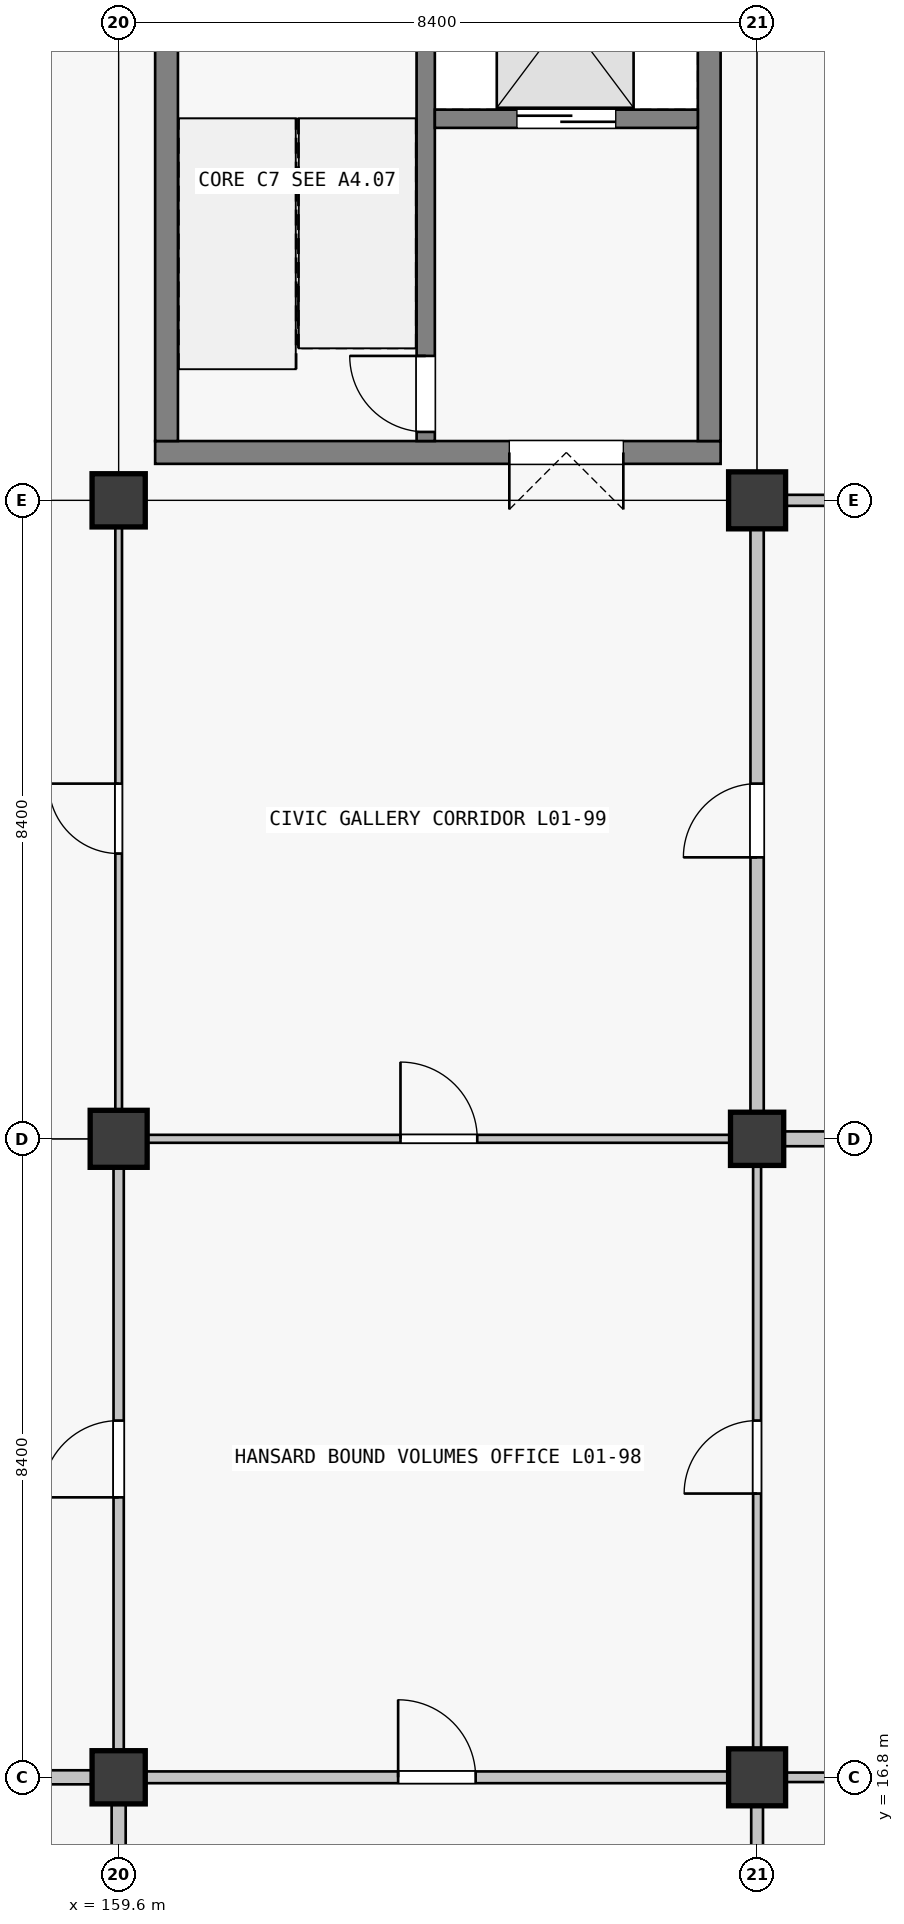
"""IFC4 building model, lengths in metres.
Left out: names, types, materials, properties, quantities, classifications, styles, units other than length and angle.
Written with IfcOpenShell. Run it as: python <this file> out.ifc"""

import sys

from ifc_helpers import new_model, si_unit, direction, frame, frame_2d, origin, origin_2d, place, context, subcontext, project, spatial, rectangle, extrude, element, fill, save


model = new_model("IFC4")
c1 = context("Model", 3, precision=1e-05, world=origin(), true_north=direction((0.0, 1.0)))
c2 = subcontext(c1, "Body", "Model", "MODEL_VIEW")
j1 = project(units=[si_unit("LENGTHUNIT", "METRE"), si_unit("PLANEANGLEUNIT", "RADIAN")], contexts=[c1])
p1 = place(None, origin())
s1 = spatial("IfcSite", under=j1, at=p1, CompositionType="ELEMENT")
p2 = place(p1, origin())
s2 = spatial("IfcBuilding", under=s1, at=p2, CompositionType="ELEMENT")
p3 = place(p2, frame((0.0, 0.0, 5.76)))
s3 = spatial("IfcBuildingStorey", under=s2, at=p3, CompositionType="ELEMENT", Elevation=5.76)
p4 = place(p3, frame((159.6, 16.8, 0.0), z_axis=(0.0, 0.0, 1.0), x_axis=(1.0, 0.0, 0.0)))
e1 = element("IfcColumn", 1, at=p4, inside=s3, PredefinedType="COLUMN", context=c2, shape_type="SweptSolid", body=[
    extrude(rectangle(XDim=0.7, YDim=0.7, at=origin_2d()), origin(), (0.0, 0.0, 1.0), 4.5),
])
p5 = place(p3, frame((159.6, 25.2, 0.0), z_axis=(0.0, 0.0, 1.0), x_axis=(1.0, 0.0, 0.0)))
e2 = element("IfcColumn", 2, at=p5, inside=s3, PredefinedType="COLUMN", context=c2, shape_type="SweptSolid", body=[
    extrude(rectangle(XDim=0.75, YDim=0.75, at=origin_2d()), origin(), (0.0, 0.0, 1.0), 4.5),
])
p6 = place(p3, frame((159.6, 33.6, 0.0), z_axis=(0.0, 0.0, 1.0), x_axis=(1.0, 0.0, 0.0)))
e3 = element("IfcColumn", 3, at=p6, inside=s3, PredefinedType="COLUMN", context=c2, shape_type="SweptSolid", body=[
    extrude(rectangle(XDim=0.7, YDim=0.7, at=origin_2d()), origin(), (0.0, 0.0, 1.0), 4.5),
])
p7 = place(p3, frame((168.0, 16.8, 0.0), z_axis=(0.0, 0.0, 1.0), x_axis=(1.0, 0.0, 0.0)))
e4 = element("IfcColumn", 4, at=p7, inside=s3, PredefinedType="COLUMN", context=c2, shape_type="SweptSolid", body=[
    extrude(rectangle(XDim=0.75, YDim=0.75, at=origin_2d()), origin(), (0.0, 0.0, 1.0), 4.5),
])
p8 = place(p3, frame((168.0, 25.2, 0.0), z_axis=(0.0, 0.0, 1.0), x_axis=(1.0, 0.0, 0.0)))
e5 = element("IfcColumn", 5, at=p8, inside=s3, PredefinedType="COLUMN", context=c2, shape_type="SweptSolid", body=[
    extrude(rectangle(XDim=0.7, YDim=0.7, at=origin_2d()), origin(), (0.0, 0.0, 1.0), 4.5),
])
p9 = place(p3, frame((168.0, 33.6, 0.0), z_axis=(0.0, 0.0, 1.0), x_axis=(1.0, 0.0, 0.0)))
e6 = element("IfcColumn", 6, at=p9, inside=s3, PredefinedType="COLUMN", context=c2, shape_type="SweptSolid", body=[
    extrude(rectangle(XDim=0.75, YDim=0.75, at=origin_2d()), origin(), (0.0, 0.0, 1.0), 4.5),
])
p10 = place(p3, frame((167.52, 34.23, 0.0), z_axis=(0.0, 0.0, 1.0), x_axis=(-1.0, 0.0, 0.0)))
e7 = element("IfcWall", 7, at=p10, inside=s3, PredefinedType="SHEAR", context=c2, shape_type="SweptSolid", body=[
    extrude(rectangle(XDim=7.44, YDim=0.3, at=frame_2d((3.72, 0.0))), origin(), (0.0, 0.0, 1.0), 4.5),
])
p11 = place(p10, frame((1.28, 0.0, 0.0)))
e8 = element("IfcOpeningElement", 8, at=p11, cuts=e7, PredefinedType="OPENING", context=c2, shape_type="SweptSolid", body=[
    extrude(rectangle(XDim=1.5, YDim=2.15, at=frame_2d((0.75, 1.075))), frame((0.0, 0.15, 0.0), z_axis=(0.0, -1.0, 0.0), x_axis=(1.0, 0.0, 0.0)), (0.0, 0.0, 1.0), 0.3),
])
for number, where, z_axis, x_axis in (
    (9, (160.23, 34.38, 0.0), (0.0, 0.0, 1.0), (0.0, 1.0, 0.0)),
    (10, (167.37, 41.22, 0.0), (0.0, 0.0, 1.0), (0.0, -1.0, 0.0)),
):
    element("IfcWall", number, at=place(p3, frame(where, z_axis=z_axis, x_axis=x_axis)), inside=s3, PredefinedType="SHEAR", context=c2, shape_type="SweptSolid", body=[
        extrude(rectangle(XDim=6.84, YDim=0.3, at=frame_2d((3.42, 0.0))), origin(), (0.0, 0.0, 1.0), 4.5),
    ])
p12 = place(p3, frame((163.64, 34.38, 0.0), z_axis=(0.0, 0.0, 1.0), x_axis=(0.0, 1.0, 0.0)))
e11 = element("IfcWall", 11, at=p12, inside=s3, PredefinedType="SHEAR", context=c2, shape_type="SweptSolid", body=[
    extrude(rectangle(XDim=6.84, YDim=0.24, at=frame_2d((3.42, 0.0))), origin(), (0.0, 0.0, 1.0), 4.5),
])
p13 = place(p12, frame((0.12, 0.0, 0.0)))
e12 = element("IfcOpeningElement", 12, at=p13, cuts=e11, PredefinedType="OPENING", context=c2, shape_type="SweptSolid", body=[
    extrude(rectangle(XDim=1.0, YDim=2.15, at=frame_2d((0.5, 1.075))), frame((0.0, 0.12, 0.0), z_axis=(0.0, -1.0, 0.0), x_axis=(1.0, 0.0, 0.0)), (0.0, 0.0, 1.0), 0.24),
])
p14 = place(p3, frame((163.76, 38.62, 0.0), z_axis=(0.0, 0.0, 1.0), x_axis=(1.0, 0.0, 0.0)))
e13 = element("IfcWall", 13, at=p14, inside=s3, PredefinedType="SHEAR", context=c2, shape_type="SweptSolid", body=[
    extrude(rectangle(XDim=3.46, YDim=0.24, at=frame_2d((1.73, 0.0))), origin(), (0.0, 0.0, 1.0), 4.5),
])
p15 = place(p14, frame((1.08, 0.0, 0.0)))
e14 = element("IfcOpeningElement", 14, at=p15, cuts=e13, PredefinedType="OPENING", context=c2, shape_type="SweptSolid", body=[
    extrude(rectangle(XDim=1.3, YDim=2.25, at=frame_2d((0.65, 1.125))), frame((0.0, 0.12, 0.0), z_axis=(0.0, -1.0, 0.0), x_axis=(1.0, 0.0, 0.0)), (0.0, 0.0, 1.0), 0.24),
])
p16 = place(p3, frame((151.577, 16.8, 0.0), z_axis=(0.0, 0.0, 1.0), x_axis=(1.0, 0.0, 0.0)))
e15 = element("IfcWall", 15, at=p16, inside=s3, PredefinedType="PARTITIONING", context=c2, shape_type="SweptSolid", body=[
    extrude(rectangle(XDim=7.671, YDim=0.185, at=frame_2d((3.835, 0.0))), origin(), (0.0, 0.0, 1.0), 2.4),
])
p17 = place(p16, frame((3.356, 0.0, 0.0)))
e16 = element("IfcOpeningElement", 16, at=p17, cuts=e15, PredefinedType="OPENING", context=c2, shape_type="SweptSolid", body=[
    extrude(rectangle(XDim=0.96, YDim=2.18, at=frame_2d((0.48, 1.09))), frame((0.0, 0.093, 0.0), z_axis=(0.0, -1.0, 0.0), x_axis=(1.0, 0.0, 0.0)), (0.0, 0.0, 1.0), 0.185),
])
p18 = place(p3, frame((159.952, 16.8, 0.0), z_axis=(0.0, 0.0, 1.0), x_axis=(1.0, 0.0, 0.0)))
e17 = element("IfcWall", 17, at=p18, inside=s3, PredefinedType="PARTITIONING", context=c2, shape_type="SweptSolid", body=[
    extrude(rectangle(XDim=7.671, YDim=0.155, at=frame_2d((3.835, 0.0))), origin(), (0.0, 0.0, 1.0), 2.4),
])
p19 = place(p18, frame((3.325, 0.0, 0.0)))
e18 = element("IfcOpeningElement", 18, at=p19, cuts=e17, PredefinedType="OPENING", context=c2, shape_type="SweptSolid", body=[
    extrude(rectangle(XDim=1.02, YDim=2.2, at=frame_2d((0.51, 1.1))), frame((0.0, 0.078, 0.0), z_axis=(0.0, -1.0, 0.0), x_axis=(1.0, 0.0, 0.0)), (0.0, 0.0, 1.0), 0.155),
])
p20 = place(p3, frame((159.977, 25.2, 0.0), z_axis=(0.0, 0.0, 1.0), x_axis=(1.0, 0.0, 0.0)))
e19 = element("IfcWall", 19, at=p20, inside=s3, PredefinedType="PARTITIONING", context=c2, shape_type="SweptSolid", body=[
    extrude(rectangle(XDim=7.671, YDim=0.105, at=frame_2d((3.835, 0.0))), origin(), (0.0, 0.0, 1.0), 2.4),
])
p21 = place(p20, frame((3.331, 0.0, 0.0)))
e20 = element("IfcOpeningElement", 20, at=p21, cuts=e19, PredefinedType="OPENING", context=c2, shape_type="SweptSolid", body=[
    extrude(rectangle(XDim=1.01, YDim=2.12, at=frame_2d((0.505, 1.06))), frame((0.0, 0.052, 0.0), z_axis=(0.0, -1.0, 0.0), x_axis=(1.0, 0.0, 0.0)), (0.0, 0.0, 1.0), 0.105),
])
p22 = place(p3, frame((168.377, 16.8, 0.0), z_axis=(0.0, 0.0, 1.0), x_axis=(1.0, 0.0, 0.0)))
e21 = element("IfcWall", 21, at=p22, inside=s3, PredefinedType="PARTITIONING", context=c2, shape_type="SweptSolid", body=[
    extrude(rectangle(XDim=7.746, YDim=0.125, at=frame_2d((3.873, 0.0))), origin(), (0.0, 0.0, 1.0), 2.4),
])
p23 = place(p22, frame((3.343, 0.0, 0.0)))
e22 = element("IfcOpeningElement", 22, at=p23, cuts=e21, PredefinedType="OPENING", context=c2, shape_type="SweptSolid", body=[
    extrude(rectangle(XDim=1.06, YDim=2.22, at=frame_2d((0.53, 1.11))), frame((0.0, 0.062, 0.0), z_axis=(0.0, -1.0, 0.0), x_axis=(1.0, 0.0, 0.0)), (0.0, 0.0, 1.0), 0.125),
])
p24 = place(p3, frame((168.352, 25.2, 0.0), z_axis=(0.0, 0.0, 1.0), x_axis=(1.0, 0.0, 0.0)))
e23 = element("IfcWall", 23, at=p24, inside=s3, PredefinedType="PARTITIONING", context=c2, shape_type="SweptSolid", body=[
    extrude(rectangle(XDim=7.771, YDim=0.195, at=frame_2d((3.885, 0.0))), origin(), (0.0, 0.0, 1.0), 2.4),
])
p25 = place(p24, frame((3.385, 0.0, 0.0)))
e24 = element("IfcOpeningElement", 24, at=p25, cuts=e23, PredefinedType="OPENING", context=c2, shape_type="SweptSolid", body=[
    extrude(rectangle(XDim=1.0, YDim=2.2, at=frame_2d((0.5, 1.1))), frame((0.0, 0.098, 0.0), z_axis=(0.0, -1.0, 0.0), x_axis=(1.0, 0.0, 0.0)), (0.0, 0.0, 1.0), 0.195),
])
p26 = place(p3, frame((168.377, 33.6, 0.0), z_axis=(0.0, 0.0, 1.0), x_axis=(1.0, 0.0, 0.0)))
e25 = element("IfcWall", 25, at=p26, inside=s3, PredefinedType="PARTITIONING", context=c2, shape_type="SweptSolid", body=[
    extrude(rectangle(XDim=7.746, YDim=0.145, at=frame_2d((3.873, 0.0))), origin(), (0.0, 0.0, 1.0), 2.4),
])
p27 = place(p26, frame((3.353, 0.0, 0.0)))
e26 = element("IfcOpeningElement", 26, at=p27, cuts=e25, PredefinedType="OPENING", context=c2, shape_type="SweptSolid", body=[
    extrude(rectangle(XDim=1.04, YDim=2.2, at=frame_2d((0.52, 1.1))), frame((0.0, 0.073, 0.0), z_axis=(0.0, -1.0, 0.0), x_axis=(1.0, 0.0, 0.0)), (0.0, 0.0, 1.0), 0.145),
])
p28 = place(p3, frame((159.6, 8.727, 0.0), z_axis=(0.0, 0.0, 1.0), x_axis=(0.0, 1.0, 0.0)))
e27 = element("IfcWall", 27, at=p28, inside=s3, PredefinedType="PARTITIONING", context=c2, shape_type="SweptSolid", body=[
    extrude(rectangle(XDim=7.721, YDim=0.185, at=frame_2d((3.86, 0.0))), origin(), (0.0, 0.0, 1.0), 2.4),
])
p29 = place(p28, frame((3.33, 0.0, 0.0)))
e28 = element("IfcOpeningElement", 28, at=p29, cuts=e27, PredefinedType="OPENING", context=c2, shape_type="SweptSolid", body=[
    extrude(rectangle(XDim=1.06, YDim=2.22, at=frame_2d((0.53, 1.11))), frame((0.0, 0.093, 0.0), z_axis=(0.0, -1.0, 0.0), x_axis=(1.0, 0.0, 0.0)), (0.0, 0.0, 1.0), 0.185),
])
p30 = place(p3, frame((159.6, 17.152, 0.0), z_axis=(0.0, 0.0, 1.0), x_axis=(0.0, 1.0, 0.0)))
e29 = element("IfcWall", 29, at=p30, inside=s3, PredefinedType="PARTITIONING", context=c2, shape_type="SweptSolid", body=[
    extrude(rectangle(XDim=7.671, YDim=0.135, at=frame_2d((3.835, 0.0))), origin(), (0.0, 0.0, 1.0), 2.4),
])
p31 = place(p30, frame((3.331, 0.0, 0.0)))
e30 = element("IfcOpeningElement", 30, at=p31, cuts=e29, PredefinedType="OPENING", context=c2, shape_type="SweptSolid", body=[
    extrude(rectangle(XDim=1.01, YDim=2.12, at=frame_2d((0.505, 1.06))), frame((0.0, 0.067, 0.0), z_axis=(0.0, -1.0, 0.0), x_axis=(1.0, 0.0, 0.0)), (0.0, 0.0, 1.0), 0.135),
])
p32 = place(p3, frame((159.6, 25.577, 0.0), z_axis=(0.0, 0.0, 1.0), x_axis=(0.0, 1.0, 0.0)))
e31 = element("IfcWall", 31, at=p32, inside=s3, PredefinedType="PARTITIONING", context=c2, shape_type="SweptSolid", body=[
    extrude(rectangle(XDim=7.671, YDim=0.088, at=frame_2d((3.835, 0.0))), origin(), (0.0, 0.0, 1.0), 2.4),
])
p33 = place(p32, frame((3.376, 0.0, 0.0)))
e32 = element("IfcOpeningElement", 32, at=p33, cuts=e31, PredefinedType="OPENING", context=c2, shape_type="SweptSolid", body=[
    extrude(rectangle(XDim=0.92, YDim=2.15, at=frame_2d((0.46, 1.075))), frame((0.0, 0.044, 0.0), z_axis=(0.0, -1.0, 0.0), x_axis=(1.0, 0.0, 0.0)), (0.0, 0.0, 1.0), 0.088),
])
p34 = place(p3, frame((168.0, 8.702, 0.0), z_axis=(0.0, 0.0, 1.0), x_axis=(0.0, 1.0, 0.0)))
e33 = element("IfcWall", 33, at=p34, inside=s3, PredefinedType="PARTITIONING", context=c2, shape_type="SweptSolid", body=[
    extrude(rectangle(XDim=7.721, YDim=0.155, at=frame_2d((3.861, 0.0))), origin(), (0.0, 0.0, 1.0), 2.4),
])
p35 = place(p34, frame((3.37, 0.0, 0.0)))
e34 = element("IfcOpeningElement", 34, at=p35, cuts=e33, PredefinedType="OPENING", context=c2, shape_type="SweptSolid", body=[
    extrude(rectangle(XDim=0.98, YDim=2.18, at=frame_2d((0.49, 1.09))), frame((0.0, 0.078, 0.0), z_axis=(0.0, -1.0, 0.0), x_axis=(1.0, 0.0, 0.0)), (0.0, 0.0, 1.0), 0.155),
])
p36 = place(p3, frame((168.0, 17.177, 0.0), z_axis=(0.0, 0.0, 1.0), x_axis=(0.0, 1.0, 0.0)))
e35 = element("IfcWall", 35, at=p36, inside=s3, PredefinedType="PARTITIONING", context=c2, shape_type="SweptSolid", body=[
    extrude(rectangle(XDim=7.671, YDim=0.105, at=frame_2d((3.835, 0.0))), origin(), (0.0, 0.0, 1.0), 2.4),
])
p37 = place(p36, frame((3.356, 0.0, 0.0)))
e36 = element("IfcOpeningElement", 36, at=p37, cuts=e35, PredefinedType="OPENING", context=c2, shape_type="SweptSolid", body=[
    extrude(rectangle(XDim=0.96, YDim=2.18, at=frame_2d((0.48, 1.09))), frame((0.0, 0.052, 0.0), z_axis=(0.0, -1.0, 0.0), x_axis=(1.0, 0.0, 0.0)), (0.0, 0.0, 1.0), 0.105),
])
p38 = place(p3, frame((168.0, 25.552, 0.0), z_axis=(0.0, 0.0, 1.0), x_axis=(0.0, 1.0, 0.0)))
e37 = element("IfcWall", 37, at=p38, inside=s3, PredefinedType="PARTITIONING", context=c2, shape_type="SweptSolid", body=[
    extrude(rectangle(XDim=7.671, YDim=0.175, at=frame_2d((3.835, 0.0))), origin(), (0.0, 0.0, 1.0), 2.4),
])
p39 = place(p38, frame((3.351, 0.0, 0.0)))
e38 = element("IfcOpeningElement", 38, at=p39, cuts=e37, PredefinedType="OPENING", context=c2, shape_type="SweptSolid", body=[
    extrude(rectangle(XDim=0.97, YDim=2.12, at=frame_2d((0.485, 1.06))), frame((0.0, 0.087, 0.0), z_axis=(0.0, -1.0, 0.0), x_axis=(1.0, 0.0, 0.0)), (0.0, 0.0, 1.0), 0.175),
])
p40 = place(p13, origin())
e39 = element("IfcDoor", 39, at=p40, inside=s3, OperationType="SINGLE_SWING_RIGHT", PredefinedType="DOOR", context=c2, shape_type="SweptSolid", body=[
    extrude(rectangle(XDim=1.0, YDim=2.15, at=frame_2d((0.5, 1.075))), frame((0.0, 0.025, 0.0), z_axis=(0.0, -1.0, 0.0), x_axis=(1.0, 0.0, 0.0)), (0.0, 0.0, 1.0), 0.05),
])
fill(e12, e39)
p41 = place(p11, origin())
e40 = element("IfcDoor", 40, at=p41, inside=s3, OperationType="DOUBLE_DOOR_SINGLE_SWING", PredefinedType="DOOR", context=c2, shape_type="SweptSolid", body=[
    extrude(rectangle(XDim=1.5, YDim=2.15, at=frame_2d((0.75, 1.075))), frame((0.0, 0.025, 0.0), z_axis=(0.0, -1.0, 0.0), x_axis=(1.0, 0.0, 0.0)), (0.0, 0.0, 1.0), 0.05),
])
fill(e8, e40)
p42 = place(p15, origin())
e41 = element("IfcDoor", 41, at=p42, inside=s3, OperationType="DOUBLE_DOOR_SLIDING", PredefinedType="DOOR", context=c2, shape_type="SweptSolid", body=[
    extrude(rectangle(XDim=1.3, YDim=2.25, at=frame_2d((0.65, 1.125))), frame((0.0, 0.025, 0.0), z_axis=(0.0, -1.0, 0.0), x_axis=(1.0, 0.0, 0.0)), (0.0, 0.0, 1.0), 0.05),
])
fill(e14, e41)
p43 = place(p21, origin())
e42 = element("IfcDoor", 42, at=p43, inside=s3, OperationType="SINGLE_SWING_LEFT", PredefinedType="DOOR", context=c2, shape_type="SweptSolid", body=[
    extrude(rectangle(XDim=1.01, YDim=2.12, at=frame_2d((0.505, 1.06))), frame((0.0, 0.025, 0.0), z_axis=(0.0, -1.0, 0.0), x_axis=(1.0, 0.0, 0.0)), (0.0, 0.0, 1.0), 0.05),
])
fill(e20, e42)
p44 = place(p33, origin())
e43 = element("IfcDoor", 43, at=p44, inside=s3, OperationType="SINGLE_SWING_RIGHT", PredefinedType="DOOR", context=c2, shape_type="SweptSolid", body=[
    extrude(rectangle(XDim=0.92, YDim=2.15, at=frame_2d((0.46, 1.075))), frame((0.0, 0.025, 0.0), z_axis=(0.0, -1.0, 0.0), x_axis=(1.0, 0.0, 0.0)), (0.0, 0.0, 1.0), 0.05),
])
fill(e32, e43)
p45 = place(p39, origin())
e44 = element("IfcDoor", 44, at=p45, inside=s3, OperationType="SINGLE_SWING_LEFT", PredefinedType="DOOR", context=c2, shape_type="SweptSolid", body=[
    extrude(rectangle(XDim=0.97, YDim=2.12, at=frame_2d((0.485, 1.06))), frame((0.0, 0.025, 0.0), z_axis=(0.0, -1.0, 0.0), x_axis=(1.0, 0.0, 0.0)), (0.0, 0.0, 1.0), 0.05),
])
fill(e38, e44)
p46 = place(p31, origin())
e45 = element("IfcDoor", 45, at=p46, inside=s3, OperationType="SINGLE_SWING_LEFT", PredefinedType="DOOR", context=c2, shape_type="SweptSolid", body=[
    extrude(rectangle(XDim=1.01, YDim=2.12, at=frame_2d((0.505, 1.06))), frame((0.0, 0.025, 0.0), z_axis=(0.0, -1.0, 0.0), x_axis=(1.0, 0.0, 0.0)), (0.0, 0.0, 1.0), 0.05),
])
fill(e30, e45)
p47 = place(p19, origin())
e46 = element("IfcDoor", 46, at=p47, inside=s3, OperationType="SINGLE_SWING_LEFT", PredefinedType="DOOR", context=c2, shape_type="SweptSolid", body=[
    extrude(rectangle(XDim=1.02, YDim=2.2, at=frame_2d((0.51, 1.1))), frame((0.0, 0.025, 0.0), z_axis=(0.0, -1.0, 0.0), x_axis=(1.0, 0.0, 0.0)), (0.0, 0.0, 1.0), 0.05),
])
fill(e18, e46)
p48 = place(p37, origin())
e47 = element("IfcDoor", 47, at=p48, inside=s3, OperationType="SINGLE_SWING_LEFT", PredefinedType="DOOR", context=c2, shape_type="SweptSolid", body=[
    extrude(rectangle(XDim=0.96, YDim=2.18, at=frame_2d((0.48, 1.09))), frame((0.0, 0.025, 0.0), z_axis=(0.0, -1.0, 0.0), x_axis=(1.0, 0.0, 0.0)), (0.0, 0.0, 1.0), 0.05),
])
fill(e36, e47)
save(model, sys.argv[1])
